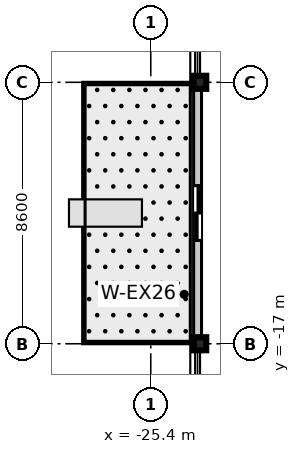
"""IFC4 building model, lengths in metres.
Left out: names, types, materials, properties, quantities, classifications, styles, units other than length and angle.
Written with IfcOpenShell. Run it as: python <this file> out.ifc"""

import sys

from ifc_helpers import new_model, si_unit, direction, frame, frame_2d, origin, origin_2d, place, context, subcontext, project, spatial, rectangle, i_section, extrude, source, transform, mapped, element, fill, save


model = new_model("IFC4")
c1 = context("Model", 3, precision=1e-05, world=origin(), true_north=direction((0.0, 1.0)))
c2 = subcontext(c1, "Body", "Model", "MODEL_VIEW")
j1 = project(units=[si_unit("LENGTHUNIT", "METRE"), si_unit("PLANEANGLEUNIT", "RADIAN")], contexts=[c1])
p1 = place(None, origin())
s1 = spatial("IfcSite", under=j1, at=p1, CompositionType="ELEMENT")
p2 = place(p1, origin())
s2 = spatial("IfcBuilding", under=s1, at=p2, CompositionType="ELEMENT")
p3 = place(p2, frame((0.0, 0.0, 110.2)))
s3 = spatial("IfcBuildingStorey", under=s2, at=p3, CompositionType="ELEMENT", Elevation=110.2)
m1 = source(origin(), c2, "Body", "SweptSolid", [
    extrude(i_section(OverallWidth=0.409, OverallDepth=0.43, WebThickness=0.021, FlangeThickness=0.034, at=origin_2d()), origin(), (0.0, 0.0, 1.0), 3.605),
])
for number, where, z_axis, x_axis in (
    (1, (-23.78, -17.0, 0.0), (0.0, 0.0, 1.0), (1.0, 0.0, 0.0)),
    (2, (-23.78, -8.4, 0.0), (0.0, 0.0, 1.0), (1.0, 0.0, 0.0)),
):
    element("IfcColumn", number, at=place(p3, frame(where, z_axis=z_axis, x_axis=x_axis)), inside=s3, PredefinedType="COLUMN", context=c2, shape_type="MappedRepresentation", body=[
        mapped(m1, transform((0.0, 0.0, 0.0), scale=1.0)),
    ])
m2 = source(origin(), c2, "Body", "SweptSolid", [
    extrude(rectangle(XDim=8.6, YDim=0.26, at=frame_2d((4.3, 0.0))), origin(), (0.0, 0.0, 1.0), 2.86),
])
p4 = place(p3, frame((-23.86, -17.0, 0.0), z_axis=(0.0, 0.0, 1.0), x_axis=(0.0, 1.0, 0.0)))
e3 = element("IfcWall", 3, at=p4, inside=s3, PredefinedType="STANDARD", context=c2, shape_type="MappedRepresentation", body=[
    mapped(m2, transform((0.0, 0.0, 0.0), scale=1.0)),
])
p5 = place(p4, frame((3.4, 0.0, 0.0)))
e4 = element("IfcOpeningElement", 4, at=p5, cuts=e3, PredefinedType="OPENING", context=c2, shape_type="SweptSolid", body=[
    extrude(rectangle(XDim=1.8, YDim=2.25, at=frame_2d((0.9, 1.125))), frame((0.0, 0.14, 0.0), z_axis=(0.0, -1.0, 0.0), x_axis=(1.0, 0.0, 0.0)), (0.0, 0.0, 1.0), 0.28),
])
m3 = source(origin(), c2, "Body", "SweptSolid", [
    extrude(rectangle(XDim=1.8, YDim=2.25, at=frame_2d((0.9, 1.125))), frame((0.0, 0.025, 0.0), z_axis=(0.0, -1.0, 0.0), x_axis=(1.0, 0.0, 0.0)), (0.0, 0.0, 1.0), 0.05),
])
p6 = place(p5, origin())
e5 = element("IfcDoor", 5, at=p6, inside=s3, OperationType="DOUBLE_DOOR_SLIDING", PredefinedType="DOOR", context=c2, shape_type="MappedRepresentation", body=[
    mapped(m3, transform((0.0, 0.0, 0.0), scale=1.0)),
])
fill(e4, e5)
save(model, sys.argv[1])
